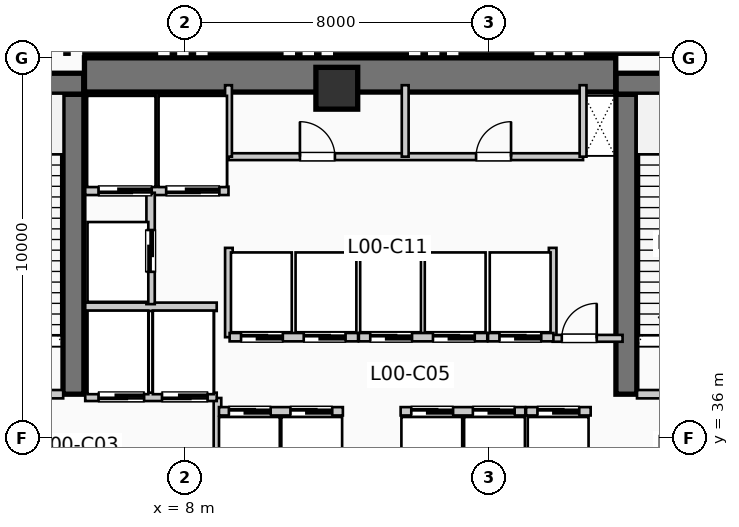
"""IFC4 building model, lengths in metres.
Left out: names, types, materials, properties, quantities, classifications, styles, units other than length and angle.
Written with IfcOpenShell. Run it as: python <this file> out.ifc"""

import sys

from ifc_helpers import new_model, si_unit, direction, frame, frame_2d, origin, origin_2d, place, context, subcontext, project, spatial, rectangle, extrude, element, fill, save


model = new_model("IFC4")
c1 = context("Model", 3, precision=1e-05, world=origin(), true_north=direction((0.0, 1.0)))
c2 = subcontext(c1, "Body", "Model", "MODEL_VIEW")
j1 = project(units=[si_unit("LENGTHUNIT", "METRE"), si_unit("PLANEANGLEUNIT", "RADIAN")], contexts=[c1])
p1 = place(None, origin())
s1 = spatial("IfcSite", under=j1, at=p1, CompositionType="ELEMENT")
p2 = place(p1, origin())
s2 = spatial("IfcBuilding", under=s1, at=p2, CompositionType="ELEMENT")
p3 = place(p2, origin())
s3 = spatial("IfcBuildingStorey", under=s2, at=p3, CompositionType="ELEMENT", Elevation=0.0)
p4 = place(p3, frame((5.36, 45.55, 0.0), z_axis=(0.0, 0.0, 1.0), x_axis=(1.0, 0.0, 0.0)))
e1 = element("IfcWall", 1, at=p4, inside=s3, PredefinedType="SHEAR", context=c2, shape_type="SweptSolid", body=[
    extrude(rectangle(XDim=13.98, YDim=0.9, at=frame_2d((6.99, 0.0))), origin(), (0.0, 0.0, 1.0), 5.94),
])
p5 = place(p3, frame((5.07, 37.15, 0.0), z_axis=(0.0, 0.0, 1.0), x_axis=(0.0, 1.0, 0.0)))
e2 = element("IfcWall", 2, at=p5, inside=s3, PredefinedType="SHEAR", context=c2, shape_type="SweptSolid", body=[
    extrude(rectangle(XDim=7.89, YDim=0.55, at=frame_2d((3.945, 0.0))), origin(), (0.0, 0.0, 1.0), 5.94),
])
p6 = place(p3, frame((1.1, 45.32, 0.0), z_axis=(0.0, 0.0, 1.0), x_axis=(1.0, 0.0, 0.0)))
e3 = element("IfcWall", 3, at=p6, inside=s3, PredefinedType="SHEAR", context=c2, shape_type="SweptSolid", body=[
    extrude(rectangle(XDim=4.24, YDim=0.55, at=frame_2d((2.12, 0.0))), origin(), (0.0, 0.0, 1.0), 5.94),
])
p7 = place(p3, frame((19.62, 37.15, 0.0), z_axis=(0.0, 0.0, 1.0), x_axis=(0.0, 1.0, 0.0)))
e4 = element("IfcWall", 4, at=p7, inside=s3, PredefinedType="SHEAR", context=c2, shape_type="SweptSolid", body=[
    extrude(rectangle(XDim=7.89, YDim=0.55, at=frame_2d((3.945, 0.0))), origin(), (0.0, 0.0, 1.0), 5.94),
])
p8 = place(p3, frame((19.35, 45.32, 0.0), z_axis=(0.0, 0.0, 1.0), x_axis=(1.0, 0.0, 0.0)))
e5 = element("IfcWall", 5, at=p8, inside=s3, PredefinedType="SHEAR", context=c2, shape_type="SweptSolid", body=[
    extrude(rectangle(XDim=3.69, YDim=0.55, at=frame_2d((1.845, 0.0))), origin(), (0.0, 0.0, 1.0), 5.94),
])
p9 = place(p3, frame((12.0, 45.2, 0.0), z_axis=(0.0, 0.0, 1.0), x_axis=(1.0, 0.0, 0.0)))
e6 = element("IfcColumn", 6, at=p9, inside=s3, PredefinedType="COLUMN", context=c2, shape_type="SweptSolid", body=[
    extrude(rectangle(XDim=1.1, YDim=1.1, at=origin_2d()), origin(), (0.0, 0.0, 1.0), 5.94),
])
p10 = place(p3, frame((1.65, 37.15, 0.0), z_axis=(0.0, 0.0, 1.0), x_axis=(1.0, 0.0, 0.0)))
e7 = element("IfcWall", 7, at=p10, inside=s3, PredefinedType="PARTITIONING", context=c2, shape_type="SweptSolid", body=[
    extrude(rectangle(XDim=3.15, YDim=0.22, at=frame_2d((1.575, 0.0))), origin(), (0.0, 0.0, 1.0), 5.62),
])
p11 = place(p10, frame((2.05, 0.0, 0.0), z_axis=(0.0, 0.0, 1.0), x_axis=(-1.0, 0.0, 0.0)))
e8 = element("IfcOpeningElement", 8, at=p11, cuts=e7, PredefinedType="OPENING", context=c2, shape_type="SweptSolid", body=[
    extrude(rectangle(XDim=1.05, YDim=2.15, at=frame_2d((0.525, 1.075))), frame((0.0, 0.12, 0.0), z_axis=(0.0, -1.0, 0.0), x_axis=(1.0, 0.0, 0.0)), (0.0, 0.0, 1.0), 0.24),
])
p12 = place(p3, frame((8.86, 34.55, 0.0), z_axis=(0.0, 0.0, 1.0), x_axis=(0.0, 1.0, 0.0)))
e9 = element("IfcWall", 9, at=p12, inside=s3, PredefinedType="PARTITIONING", context=c2, shape_type="SweptSolid", body=[
    extrude(rectangle(XDim=2.5, YDim=0.2, at=frame_2d((1.25, 0.0))), origin(), (0.0, 0.0, 1.0), 5.62),
])
p13 = place(p3, frame((19.9, 37.15, 0.0), z_axis=(0.0, 0.0, 1.0), x_axis=(1.0, 0.0, 0.0)))
e10 = element("IfcWall", 10, at=p13, inside=s3, PredefinedType="PARTITIONING", context=c2, shape_type="SweptSolid", body=[
    extrude(rectangle(XDim=3.15, YDim=0.22, at=frame_2d((1.575, 0.0))), origin(), (0.0, 0.0, 1.0), 5.62),
])
p14 = place(p13, frame((2.05, 0.0, 0.0), z_axis=(0.0, 0.0, 1.0), x_axis=(-1.0, 0.0, 0.0)))
e11 = element("IfcOpeningElement", 11, at=p14, cuts=e10, PredefinedType="OPENING", context=c2, shape_type="SweptSolid", body=[
    extrude(rectangle(XDim=1.05, YDim=2.15, at=frame_2d((0.525, 1.075))), frame((0.0, 0.12, 0.0), z_axis=(0.0, -1.0, 0.0), x_axis=(1.0, 0.0, 0.0)), (0.0, 0.0, 1.0), 0.24),
])
p15 = place(p3, frame((5.38, 37.08, 0.0), z_axis=(0.0, 0.0, 1.0), x_axis=(1.0, 0.0, 0.0)))
e12 = element("IfcWall", 12, at=p15, inside=s3, PredefinedType="PARTITIONING", context=c2, shape_type="SweptSolid", body=[
    extrude(rectangle(XDim=3.46, YDim=0.22, at=frame_2d((1.73, 0.0))), origin(), (0.0, 0.0, 1.0), 5.62),
])
p16 = place(p15, frame((1.55, 0.0, 0.0), z_axis=(0.0, 0.0, 1.0), x_axis=(-1.0, 0.0, 0.0)))
e13 = element("IfcOpeningElement", 13, at=p16, cuts=e12, PredefinedType="OPENING", context=c2, shape_type="SweptSolid", body=[
    extrude(rectangle(XDim=1.2, YDim=2.2, at=frame_2d((0.6, 1.1))), frame((0.0, 0.12, 0.0), z_axis=(0.0, -1.0, 0.0), x_axis=(1.0, 0.0, 0.0)), (0.0, 0.0, 1.0), 0.24),
])
p17 = place(p15, frame((3.22, 0.0, 0.0), z_axis=(0.0, 0.0, 1.0), x_axis=(-1.0, 0.0, 0.0)))
e14 = element("IfcOpeningElement", 14, at=p17, cuts=e12, PredefinedType="OPENING", context=c2, shape_type="SweptSolid", body=[
    extrude(rectangle(XDim=1.2, YDim=2.2, at=frame_2d((0.6, 1.1))), frame((0.0, 0.12, 0.0), z_axis=(0.0, -1.0, 0.0), x_axis=(1.0, 0.0, 0.0)), (0.0, 0.0, 1.0), 0.24),
])
p18 = place(p3, frame((5.38, 39.45, 0.0), z_axis=(0.0, 0.0, 1.0), x_axis=(1.0, 0.0, 0.0)))
e15 = element("IfcWall", 15, at=p18, inside=s3, PredefinedType="PARTITIONING", context=c2, shape_type="SweptSolid", body=[
    extrude(rectangle(XDim=3.46, YDim=0.22, at=frame_2d((1.73, 0.0))), origin(), (0.0, 0.0, 1.0), 5.62),
])
p19 = place(p3, frame((5.38, 42.5, 0.0), z_axis=(0.0, 0.0, 1.0), x_axis=(1.0, 0.0, 0.0)))
e16 = element("IfcWall", 16, at=p19, inside=s3, PredefinedType="PARTITIONING", context=c2, shape_type="SweptSolid", body=[
    extrude(rectangle(XDim=3.77, YDim=0.22, at=frame_2d((1.885, 0.0))), origin(), (0.0, 0.0, 1.0), 5.62),
])
p20 = place(p19, frame((1.75, 0.0, 0.0), z_axis=(0.0, 0.0, 1.0), x_axis=(-1.0, 0.0, 0.0)))
e17 = element("IfcOpeningElement", 17, at=p20, cuts=e16, PredefinedType="OPENING", context=c2, shape_type="SweptSolid", body=[
    extrude(rectangle(XDim=1.4, YDim=2.2, at=frame_2d((0.7, 1.1))), frame((0.0, 0.12, 0.0), z_axis=(0.0, -1.0, 0.0), x_axis=(1.0, 0.0, 0.0)), (0.0, 0.0, 1.0), 0.24),
])
p21 = place(p19, frame((3.53, 0.0, 0.0), z_axis=(0.0, 0.0, 1.0), x_axis=(-1.0, 0.0, 0.0)))
e18 = element("IfcOpeningElement", 18, at=p21, cuts=e16, PredefinedType="OPENING", context=c2, shape_type="SweptSolid", body=[
    extrude(rectangle(XDim=1.4, YDim=2.2, at=frame_2d((0.7, 1.1))), frame((0.0, 0.12, 0.0), z_axis=(0.0, -1.0, 0.0), x_axis=(1.0, 0.0, 0.0)), (0.0, 0.0, 1.0), 0.24),
])
p22 = place(p3, frame((7.1, 39.52, 0.0), z_axis=(0.0, 0.0, 1.0), x_axis=(0.0, 1.0, 0.0)))
e19 = element("IfcWall", 19, at=p22, inside=s3, PredefinedType="PARTITIONING", context=c2, shape_type="SweptSolid", body=[
    extrude(rectangle(XDim=2.93, YDim=0.22, at=frame_2d((1.465, 0.0))), origin(), (0.0, 0.0, 1.0), 5.62),
])
p23 = place(p22, frame((0.85, 0.0, 0.0)))
e20 = element("IfcOpeningElement", 20, at=p23, cuts=e19, PredefinedType="OPENING", context=c2, shape_type="SweptSolid", body=[
    extrude(rectangle(XDim=1.1, YDim=2.2, at=frame_2d((0.55, 1.1))), frame((0.0, 0.12, 0.0), z_axis=(0.0, -1.0, 0.0), x_axis=(1.0, 0.0, 0.0)), (0.0, 0.0, 1.0), 0.24),
])
for number, where, z_axis, x_axis in (
    (21, (9.16, 38.65, 0.0), (0.0, 0.0, 1.0), (0.0, 1.0, 0.0)),
    (22, (17.68, 38.65, 0.0), (0.0, 0.0, 1.0), (0.0, 1.0, 0.0)),
):
    element("IfcWall", number, at=place(p3, frame(where, z_axis=z_axis, x_axis=x_axis)), inside=s3, PredefinedType="PARTITIONING", context=c2, shape_type="SweptSolid", body=[
        extrude(rectangle(XDim=2.35, YDim=0.2, at=frame_2d((1.175, 0.0))), origin(), (0.0, 0.0, 1.0), 5.62),
    ])
p24 = place(p3, frame((17.68, 38.62, 0.0), z_axis=(0.0, 0.0, 1.0), x_axis=(1.0, 0.0, 0.0)))
e23 = element("IfcWall", 23, at=p24, inside=s3, PredefinedType="PARTITIONING", context=c2, shape_type="SweptSolid", body=[
    extrude(rectangle(XDim=1.84, YDim=0.18, at=frame_2d((0.92, 0.0))), origin(), (0.0, 0.0, 1.0), 5.62),
])
p25 = place(p24, frame((0.24, 0.0, 0.0)))
e24 = element("IfcOpeningElement", 24, at=p25, cuts=e23, PredefinedType="OPENING", context=c2, shape_type="SweptSolid", body=[
    extrude(rectangle(XDim=0.92, YDim=2.1, at=frame_2d((0.46, 1.05))), frame((0.0, 0.1, 0.0), z_axis=(0.0, -1.0, 0.0), x_axis=(1.0, 0.0, 0.0)), (0.0, 0.0, 1.0), 0.2),
])
p26 = place(p3, frame((8.9, 36.7, 0.0), z_axis=(0.0, 0.0, 1.0), x_axis=(1.0, 0.0, 0.0)))
e25 = element("IfcWall", 25, at=p26, inside=s3, PredefinedType="PARTITIONING", context=c2, shape_type="SweptSolid", body=[
    extrude(rectangle(XDim=3.26, YDim=0.22, at=frame_2d((1.63, 0.0))), origin(), (0.0, 0.0, 1.0), 5.62),
])
p27 = place(p26, frame((0.26, 0.0, 0.0)))
e26 = element("IfcOpeningElement", 26, at=p27, cuts=e25, PredefinedType="OPENING", context=c2, shape_type="SweptSolid", body=[
    extrude(rectangle(XDim=1.1, YDim=2.2, at=frame_2d((0.55, 1.1))), frame((0.0, 0.12, 0.0), z_axis=(0.0, -1.0, 0.0), x_axis=(1.0, 0.0, 0.0)), (0.0, 0.0, 1.0), 0.24),
])
p28 = place(p26, frame((1.88, 0.0, 0.0)))
e27 = element("IfcOpeningElement", 27, at=p28, cuts=e25, PredefinedType="OPENING", context=c2, shape_type="SweptSolid", body=[
    extrude(rectangle(XDim=1.1, YDim=2.2, at=frame_2d((0.55, 1.1))), frame((0.0, 0.12, 0.0), z_axis=(0.0, -1.0, 0.0), x_axis=(1.0, 0.0, 0.0)), (0.0, 0.0, 1.0), 0.24),
])
p29 = place(p3, frame((9.18, 38.65, 0.0), z_axis=(0.0, 0.0, 1.0), x_axis=(1.0, 0.0, 0.0)))
e28 = element("IfcWall", 28, at=p29, inside=s3, PredefinedType="PARTITIONING", context=c2, shape_type="SweptSolid", body=[
    extrude(rectangle(XDim=3.38, YDim=0.22, at=frame_2d((1.69, 0.0))), origin(), (0.0, 0.0, 1.0), 5.62),
])
p30 = place(p29, frame((0.3, 0.0, 0.0)))
e29 = element("IfcOpeningElement", 29, at=p30, cuts=e28, PredefinedType="OPENING", context=c2, shape_type="SweptSolid", body=[
    extrude(rectangle(XDim=1.1, YDim=2.2, at=frame_2d((0.55, 1.1))), frame((0.0, 0.12, 0.0), z_axis=(0.0, -1.0, 0.0), x_axis=(1.0, 0.0, 0.0)), (0.0, 0.0, 1.0), 0.24),
])
p31 = place(p29, frame((1.95, 0.0, 0.0)))
e30 = element("IfcOpeningElement", 30, at=p31, cuts=e28, PredefinedType="OPENING", context=c2, shape_type="SweptSolid", body=[
    extrude(rectangle(XDim=1.1, YDim=2.2, at=frame_2d((0.55, 1.1))), frame((0.0, 0.12, 0.0), z_axis=(0.0, -1.0, 0.0), x_axis=(1.0, 0.0, 0.0)), (0.0, 0.0, 1.0), 0.24),
])
p32 = place(p3, frame((13.68, 36.7, 0.0), z_axis=(0.0, 0.0, 1.0), x_axis=(1.0, 0.0, 0.0)))
e31 = element("IfcWall", 31, at=p32, inside=s3, PredefinedType="PARTITIONING", context=c2, shape_type="SweptSolid", body=[
    extrude(rectangle(XDim=3.28, YDim=0.22, at=frame_2d((1.64, 0.0))), origin(), (0.0, 0.0, 1.0), 5.62),
])
p33 = place(p32, frame((0.28, 0.0, 0.0)))
e32 = element("IfcOpeningElement", 32, at=p33, cuts=e31, PredefinedType="OPENING", context=c2, shape_type="SweptSolid", body=[
    extrude(rectangle(XDim=1.1, YDim=2.2, at=frame_2d((0.55, 1.1))), frame((0.0, 0.12, 0.0), z_axis=(0.0, -1.0, 0.0), x_axis=(1.0, 0.0, 0.0)), (0.0, 0.0, 1.0), 0.24),
])
p34 = place(p32, frame((1.9, 0.0, 0.0)))
e33 = element("IfcOpeningElement", 33, at=p34, cuts=e31, PredefinedType="OPENING", context=c2, shape_type="SweptSolid", body=[
    extrude(rectangle(XDim=1.1, YDim=2.2, at=frame_2d((0.55, 1.1))), frame((0.0, 0.12, 0.0), z_axis=(0.0, -1.0, 0.0), x_axis=(1.0, 0.0, 0.0)), (0.0, 0.0, 1.0), 0.24),
])
p35 = place(p3, frame((12.58, 38.65, 0.0), z_axis=(0.0, 0.0, 1.0), x_axis=(1.0, 0.0, 0.0)))
e34 = element("IfcWall", 34, at=p35, inside=s3, PredefinedType="PARTITIONING", context=c2, shape_type="SweptSolid", body=[
    extrude(rectangle(XDim=3.38, YDim=0.22, at=frame_2d((1.69, 0.0))), origin(), (0.0, 0.0, 1.0), 5.62),
])
p36 = place(p35, frame((0.3, 0.0, 0.0)))
e35 = element("IfcOpeningElement", 35, at=p36, cuts=e34, PredefinedType="OPENING", context=c2, shape_type="SweptSolid", body=[
    extrude(rectangle(XDim=1.1, YDim=2.2, at=frame_2d((0.55, 1.1))), frame((0.0, 0.12, 0.0), z_axis=(0.0, -1.0, 0.0), x_axis=(1.0, 0.0, 0.0)), (0.0, 0.0, 1.0), 0.24),
])
p37 = place(p35, frame((1.95, 0.0, 0.0)))
e36 = element("IfcOpeningElement", 36, at=p37, cuts=e34, PredefinedType="OPENING", context=c2, shape_type="SweptSolid", body=[
    extrude(rectangle(XDim=1.1, YDim=2.2, at=frame_2d((0.55, 1.1))), frame((0.0, 0.12, 0.0), z_axis=(0.0, -1.0, 0.0), x_axis=(1.0, 0.0, 0.0)), (0.0, 0.0, 1.0), 0.24),
])
p38 = place(p3, frame((16.98, 36.7, 0.0), z_axis=(0.0, 0.0, 1.0), x_axis=(1.0, 0.0, 0.0)))
e37 = element("IfcWall", 37, at=p38, inside=s3, PredefinedType="PARTITIONING", context=c2, shape_type="SweptSolid", body=[
    extrude(rectangle(XDim=1.7, YDim=0.22, at=frame_2d((0.85, 0.0))), origin(), (0.0, 0.0, 1.0), 5.62),
])
p39 = place(p38, frame((0.3, 0.0, 0.0)))
e38 = element("IfcOpeningElement", 38, at=p39, cuts=e37, PredefinedType="OPENING", context=c2, shape_type="SweptSolid", body=[
    extrude(rectangle(XDim=1.1, YDim=2.2, at=frame_2d((0.55, 1.1))), frame((0.0, 0.12, 0.0), z_axis=(0.0, -1.0, 0.0), x_axis=(1.0, 0.0, 0.0)), (0.0, 0.0, 1.0), 0.24),
])
p40 = place(p3, frame((15.98, 38.65, 0.0), z_axis=(0.0, 0.0, 1.0), x_axis=(1.0, 0.0, 0.0)))
e39 = element("IfcWall", 39, at=p40, inside=s3, PredefinedType="PARTITIONING", context=c2, shape_type="SweptSolid", body=[
    extrude(rectangle(XDim=1.72, YDim=0.22, at=frame_2d((0.86, 0.0))), origin(), (0.0, 0.0, 1.0), 5.62),
])
p41 = place(p40, frame((0.3, 0.0, 0.0)))
e40 = element("IfcOpeningElement", 40, at=p41, cuts=e39, PredefinedType="OPENING", context=c2, shape_type="SweptSolid", body=[
    extrude(rectangle(XDim=1.1, YDim=2.2, at=frame_2d((0.55, 1.1))), frame((0.0, 0.12, 0.0), z_axis=(0.0, -1.0, 0.0), x_axis=(1.0, 0.0, 0.0)), (0.0, 0.0, 1.0), 0.24),
])
p42 = place(p3, frame((9.15, 43.4, 0.0), z_axis=(0.0, 0.0, 1.0), x_axis=(1.0, 0.0, 0.0)))
e41 = element("IfcWall", 41, at=p42, inside=s3, PredefinedType="PLUMBINGWALL", context=c2, shape_type="SweptSolid", body=[
    extrude(rectangle(XDim=9.33, YDim=0.18, at=frame_2d((4.665, 0.0))), origin(), (0.0, 0.0, 1.0), 5.62),
])
p43 = place(p42, frame((1.88, 0.0, 0.0)))
e42 = element("IfcOpeningElement", 42, at=p43, cuts=e41, PredefinedType="OPENING", context=c2, shape_type="SweptSolid", body=[
    extrude(rectangle(XDim=0.92, YDim=2.1, at=frame_2d((0.46, 1.05))), frame((0.0, 0.1, 0.0), z_axis=(0.0, -1.0, 0.0), x_axis=(1.0, 0.0, 0.0)), (0.0, 0.0, 1.0), 0.2),
])
p44 = place(p42, frame((6.515, 0.0, 0.0)))
e43 = element("IfcOpeningElement", 43, at=p44, cuts=e41, PredefinedType="OPENING", context=c2, shape_type="SweptSolid", body=[
    extrude(rectangle(XDim=0.92, YDim=2.1, at=frame_2d((0.46, 1.05))), frame((0.0, 0.1, 0.0), z_axis=(0.0, -1.0, 0.0), x_axis=(1.0, 0.0, 0.0)), (0.0, 0.0, 1.0), 0.2),
])
for number, where, z_axis, x_axis in (
    (44, (9.15, 43.4, 0.0), (0.0, 0.0, 1.0), (0.0, 1.0, 0.0)),
    (45, (18.48, 43.4, 0.0), (0.0, 0.0, 1.0), (0.0, 1.0, 0.0)),
    (46, (13.8, 43.4, 0.0), (0.0, 0.0, 1.0), (0.0, 1.0, 0.0)),
):
    element("IfcWall", number, at=place(p3, frame(where, z_axis=z_axis, x_axis=x_axis)), inside=s3, PredefinedType="PLUMBINGWALL", context=c2, shape_type="SweptSolid", body=[
        extrude(rectangle(XDim=1.88, YDim=0.18, at=frame_2d((0.94, 0.0))), origin(), (0.0, 0.0, 1.0), 5.62),
    ])
p45 = place(p16, origin())
e47 = element("IfcDoor", 47, at=p45, inside=s3, OperationType="SLIDING_TO_RIGHT", PredefinedType="DOOR", context=c2, shape_type="SweptSolid", body=[
    extrude(rectangle(XDim=1.2, YDim=2.2, at=frame_2d((0.6, 1.1))), frame((0.0, 0.025, 0.0), z_axis=(0.0, -1.0, 0.0), x_axis=(1.0, 0.0, 0.0)), (0.0, 0.0, 1.0), 0.05),
])
fill(e13, e47)
p46 = place(p17, origin())
e48 = element("IfcDoor", 48, at=p46, inside=s3, OperationType="SLIDING_TO_RIGHT", PredefinedType="DOOR", context=c2, shape_type="SweptSolid", body=[
    extrude(rectangle(XDim=1.2, YDim=2.2, at=frame_2d((0.6, 1.1))), frame((0.0, 0.025, 0.0), z_axis=(0.0, -1.0, 0.0), x_axis=(1.0, 0.0, 0.0)), (0.0, 0.0, 1.0), 0.05),
])
fill(e14, e48)
p47 = place(p20, origin())
e49 = element("IfcDoor", 49, at=p47, inside=s3, OperationType="SLIDING_TO_LEFT", PredefinedType="DOOR", context=c2, shape_type="SweptSolid", body=[
    extrude(rectangle(XDim=1.4, YDim=2.2, at=frame_2d((0.7, 1.1))), frame((0.0, 0.025, 0.0), z_axis=(0.0, -1.0, 0.0), x_axis=(1.0, 0.0, 0.0)), (0.0, 0.0, 1.0), 0.05),
])
fill(e17, e49)
p48 = place(p21, origin())
e50 = element("IfcDoor", 50, at=p48, inside=s3, OperationType="SLIDING_TO_LEFT", PredefinedType="DOOR", context=c2, shape_type="SweptSolid", body=[
    extrude(rectangle(XDim=1.4, YDim=2.2, at=frame_2d((0.7, 1.1))), frame((0.0, 0.025, 0.0), z_axis=(0.0, -1.0, 0.0), x_axis=(1.0, 0.0, 0.0)), (0.0, 0.0, 1.0), 0.05),
])
fill(e18, e50)
p49 = place(p23, origin())
e51 = element("IfcDoor", 51, at=p49, inside=s3, OperationType="SLIDING_TO_LEFT", PredefinedType="DOOR", context=c2, shape_type="SweptSolid", body=[
    extrude(rectangle(XDim=1.1, YDim=2.2, at=frame_2d((0.55, 1.1))), frame((0.0, 0.025, 0.0), z_axis=(0.0, -1.0, 0.0), x_axis=(1.0, 0.0, 0.0)), (0.0, 0.0, 1.0), 0.05),
])
fill(e20, e51)
p50 = place(p25, origin())
e52 = element("IfcDoor", 52, at=p50, inside=s3, OperationType="SINGLE_SWING_RIGHT", PredefinedType="DOOR", context=c2, shape_type="SweptSolid", body=[
    extrude(rectangle(XDim=0.92, YDim=2.1, at=frame_2d((0.46, 1.05))), frame((0.0, 0.025, 0.0), z_axis=(0.0, -1.0, 0.0), x_axis=(1.0, 0.0, 0.0)), (0.0, 0.0, 1.0), 0.05),
])
fill(e24, e52)
p51 = place(p27, origin())
e53 = element("IfcDoor", 53, at=p51, inside=s3, OperationType="SLIDING_TO_LEFT", PredefinedType="DOOR", context=c2, shape_type="SweptSolid", body=[
    extrude(rectangle(XDim=1.1, YDim=2.2, at=frame_2d((0.55, 1.1))), frame((0.0, 0.025, 0.0), z_axis=(0.0, -1.0, 0.0), x_axis=(1.0, 0.0, 0.0)), (0.0, 0.0, 1.0), 0.05),
])
fill(e26, e53)
p52 = place(p28, origin())
e54 = element("IfcDoor", 54, at=p52, inside=s3, OperationType="SLIDING_TO_LEFT", PredefinedType="DOOR", context=c2, shape_type="SweptSolid", body=[
    extrude(rectangle(XDim=1.1, YDim=2.2, at=frame_2d((0.55, 1.1))), frame((0.0, 0.025, 0.0), z_axis=(0.0, -1.0, 0.0), x_axis=(1.0, 0.0, 0.0)), (0.0, 0.0, 1.0), 0.05),
])
fill(e27, e54)
p53 = place(p30, origin())
e55 = element("IfcDoor", 55, at=p53, inside=s3, OperationType="SLIDING_TO_LEFT", PredefinedType="DOOR", context=c2, shape_type="SweptSolid", body=[
    extrude(rectangle(XDim=1.1, YDim=2.2, at=frame_2d((0.55, 1.1))), frame((0.0, 0.025, 0.0), z_axis=(0.0, -1.0, 0.0), x_axis=(1.0, 0.0, 0.0)), (0.0, 0.0, 1.0), 0.05),
])
fill(e29, e55)
p54 = place(p31, origin())
e56 = element("IfcDoor", 56, at=p54, inside=s3, OperationType="SLIDING_TO_LEFT", PredefinedType="DOOR", context=c2, shape_type="SweptSolid", body=[
    extrude(rectangle(XDim=1.1, YDim=2.2, at=frame_2d((0.55, 1.1))), frame((0.0, 0.025, 0.0), z_axis=(0.0, -1.0, 0.0), x_axis=(1.0, 0.0, 0.0)), (0.0, 0.0, 1.0), 0.05),
])
fill(e30, e56)
p55 = place(p33, origin())
e57 = element("IfcDoor", 57, at=p55, inside=s3, OperationType="SLIDING_TO_RIGHT", PredefinedType="DOOR", context=c2, shape_type="SweptSolid", body=[
    extrude(rectangle(XDim=1.1, YDim=2.2, at=frame_2d((0.55, 1.1))), frame((0.0, 0.025, 0.0), z_axis=(0.0, -1.0, 0.0), x_axis=(1.0, 0.0, 0.0)), (0.0, 0.0, 1.0), 0.05),
])
fill(e32, e57)
p56 = place(p34, origin())
e58 = element("IfcDoor", 58, at=p56, inside=s3, OperationType="SLIDING_TO_RIGHT", PredefinedType="DOOR", context=c2, shape_type="SweptSolid", body=[
    extrude(rectangle(XDim=1.1, YDim=2.2, at=frame_2d((0.55, 1.1))), frame((0.0, 0.025, 0.0), z_axis=(0.0, -1.0, 0.0), x_axis=(1.0, 0.0, 0.0)), (0.0, 0.0, 1.0), 0.05),
])
fill(e33, e58)
p57 = place(p36, origin())
e59 = element("IfcDoor", 59, at=p57, inside=s3, OperationType="SLIDING_TO_RIGHT", PredefinedType="DOOR", context=c2, shape_type="SweptSolid", body=[
    extrude(rectangle(XDim=1.1, YDim=2.2, at=frame_2d((0.55, 1.1))), frame((0.0, 0.025, 0.0), z_axis=(0.0, -1.0, 0.0), x_axis=(1.0, 0.0, 0.0)), (0.0, 0.0, 1.0), 0.05),
])
fill(e35, e59)
p58 = place(p37, origin())
e60 = element("IfcDoor", 60, at=p58, inside=s3, OperationType="SLIDING_TO_RIGHT", PredefinedType="DOOR", context=c2, shape_type="SweptSolid", body=[
    extrude(rectangle(XDim=1.1, YDim=2.2, at=frame_2d((0.55, 1.1))), frame((0.0, 0.025, 0.0), z_axis=(0.0, -1.0, 0.0), x_axis=(1.0, 0.0, 0.0)), (0.0, 0.0, 1.0), 0.05),
])
fill(e36, e60)
p59 = place(p39, origin())
e61 = element("IfcDoor", 61, at=p59, inside=s3, OperationType="SLIDING_TO_LEFT", PredefinedType="DOOR", context=c2, shape_type="SweptSolid", body=[
    extrude(rectangle(XDim=1.1, YDim=2.2, at=frame_2d((0.55, 1.1))), frame((0.0, 0.025, 0.0), z_axis=(0.0, -1.0, 0.0), x_axis=(1.0, 0.0, 0.0)), (0.0, 0.0, 1.0), 0.05),
])
fill(e38, e61)
p60 = place(p41, origin())
e62 = element("IfcDoor", 62, at=p60, inside=s3, OperationType="SLIDING_TO_LEFT", PredefinedType="DOOR", context=c2, shape_type="SweptSolid", body=[
    extrude(rectangle(XDim=1.1, YDim=2.2, at=frame_2d((0.55, 1.1))), frame((0.0, 0.025, 0.0), z_axis=(0.0, -1.0, 0.0), x_axis=(1.0, 0.0, 0.0)), (0.0, 0.0, 1.0), 0.05),
])
fill(e40, e62)
p61 = place(p43, origin())
e63 = element("IfcDoor", 63, at=p61, inside=s3, OperationType="SINGLE_SWING_LEFT", PredefinedType="DOOR", context=c2, shape_type="SweptSolid", body=[
    extrude(rectangle(XDim=0.92, YDim=2.1, at=frame_2d((0.46, 1.05))), frame((0.0, 0.025, 0.0), z_axis=(0.0, -1.0, 0.0), x_axis=(1.0, 0.0, 0.0)), (0.0, 0.0, 1.0), 0.05),
])
fill(e42, e63)
p62 = place(p44, origin())
e64 = element("IfcDoor", 64, at=p62, inside=s3, OperationType="SINGLE_SWING_RIGHT", PredefinedType="DOOR", context=c2, shape_type="SweptSolid", body=[
    extrude(rectangle(XDim=0.92, YDim=2.1, at=frame_2d((0.46, 1.05))), frame((0.0, 0.025, 0.0), z_axis=(0.0, -1.0, 0.0), x_axis=(1.0, 0.0, 0.0)), (0.0, 0.0, 1.0), 0.05),
])
fill(e43, e64)
save(model, sys.argv[1])
